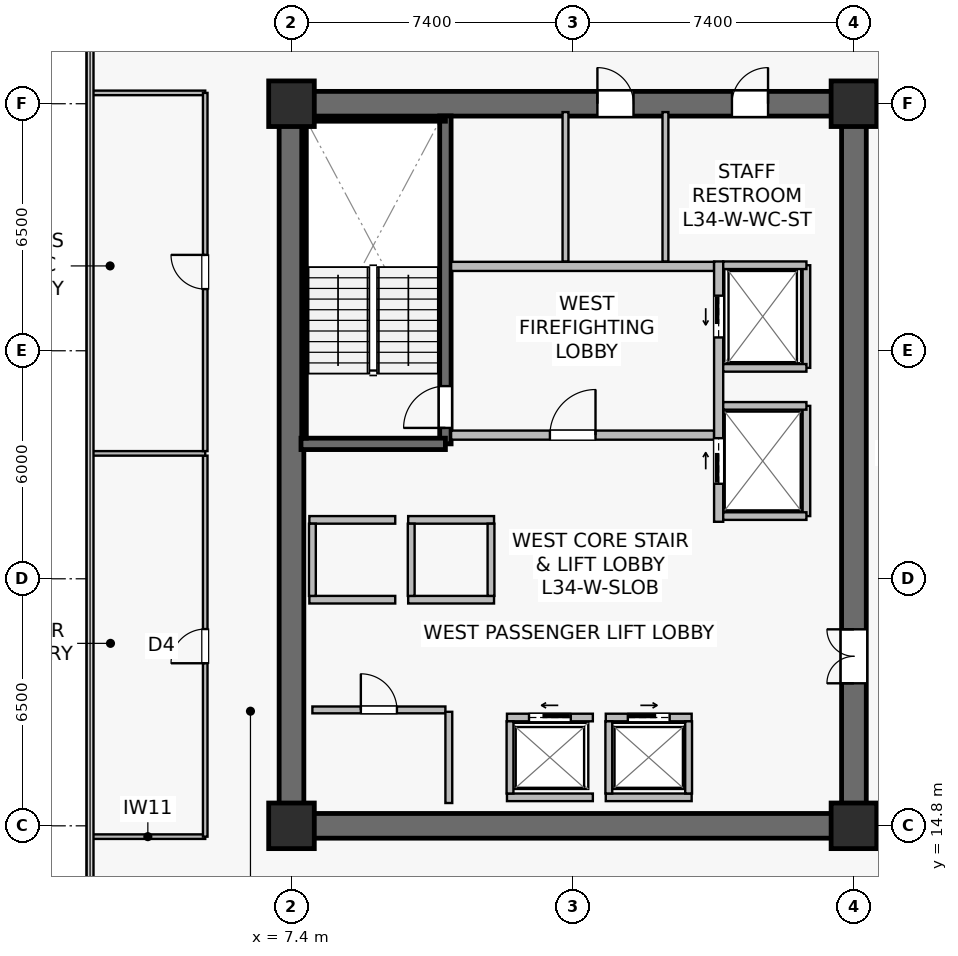
"""IFC4 building model, lengths in metres.
Left out: names, types, materials, properties, quantities, classifications, styles, units other than length and angle.
Written with IfcOpenShell. Run it as: python <this file> out.ifc"""

import sys

from ifc_helpers import new_model, si_unit, direction, frame, frame_2d, origin, origin_2d, place, context, subcontext, project, spatial, rectangle, extrude, source, transform, mapped, element, fill, save


model = new_model("IFC4")
c1 = context("Model", 3, precision=1e-05, world=origin(), true_north=direction((0.0, 1.0)))
c2 = subcontext(c1, "Body", "Model", "MODEL_VIEW")
j1 = project(units=[si_unit("LENGTHUNIT", "METRE"), si_unit("PLANEANGLEUNIT", "RADIAN")], contexts=[c1])
p1 = place(None, origin())
s1 = spatial("IfcSite", under=j1, at=p1, CompositionType="ELEMENT")
p2 = place(p1, origin())
s2 = spatial("IfcBuilding", under=s1, at=p2, CompositionType="ELEMENT")
p3 = place(p2, frame((0.0, 0.0, 142.0)))
s3 = spatial("IfcBuildingStorey", under=s2, at=p3, CompositionType="ELEMENT", Elevation=142.0)
p4 = place(p3, frame((7.075, 14.8, 0.0), z_axis=(0.0, 0.0, 1.0), x_axis=(1.0, 0.0, 0.0)))
e1 = element("IfcWall", 1, at=p4, inside=s3, PredefinedType="SHEAR", context=c2, shape_type="SweptSolid", body=[
    extrude(rectangle(XDim=15.45, YDim=0.65, at=frame_2d((7.725, 0.0))), origin(), (0.0, 0.0, 1.0), 3.79),
])
p5 = place(p3, frame((7.075, 33.8, 0.0), z_axis=(0.0, 0.0, 1.0), x_axis=(1.0, 0.0, 0.0)))
e2 = element("IfcWall", 2, at=p5, inside=s3, PredefinedType="SHEAR", context=c2, shape_type="SweptSolid", body=[
    extrude(rectangle(XDim=15.45, YDim=0.65, at=frame_2d((7.725, 0.0))), origin(), (0.0, 0.0, 1.0), 3.79),
])
p6 = place(p5, frame((8.375, 0.0, 0.0)))
e3 = element("IfcOpeningElement", 3, at=p6, cuts=e2, PredefinedType="OPENING", context=c2, shape_type="SweptSolid", body=[
    extrude(rectangle(XDim=0.95, YDim=2.15, at=frame_2d((0.475, 1.075))), frame((0.0, 0.335, 0.0), z_axis=(0.0, -1.0, 0.0), x_axis=(1.0, 0.0, 0.0)), (0.0, 0.0, 1.0), 0.67),
])
p7 = place(p5, frame((11.915, 0.0, 0.0)))
e4 = element("IfcOpeningElement", 4, at=p7, cuts=e2, PredefinedType="OPENING", context=c2, shape_type="SweptSolid", body=[
    extrude(rectangle(XDim=0.95, YDim=2.15, at=frame_2d((0.475, 1.075))), frame((0.0, 0.335, 0.0), z_axis=(0.0, -1.0, 0.0), x_axis=(1.0, 0.0, 0.0)), (0.0, 0.0, 1.0), 0.67),
])
p8 = place(p3, frame((7.4, 15.125, 0.0), z_axis=(0.0, 0.0, 1.0), x_axis=(0.0, 1.0, 0.0)))
e5 = element("IfcWall", 5, at=p8, inside=s3, PredefinedType="SHEAR", context=c2, shape_type="SweptSolid", body=[
    extrude(rectangle(XDim=18.35, YDim=0.65, at=frame_2d((9.175, 0.0))), origin(), (0.0, 0.0, 1.0), 3.79),
])
p9 = place(p3, frame((22.2, 15.125, 0.0), z_axis=(0.0, 0.0, 1.0), x_axis=(0.0, 1.0, 0.0)))
e6 = element("IfcWall", 6, at=p9, inside=s3, PredefinedType="SHEAR", context=c2, shape_type="SweptSolid", body=[
    extrude(rectangle(XDim=18.35, YDim=0.65, at=frame_2d((9.175, 0.0))), origin(), (0.0, 0.0, 1.0), 3.79),
])
p10 = place(p9, frame((3.425, 0.0, 0.0)))
e7 = element("IfcOpeningElement", 7, at=p10, cuts=e6, PredefinedType="OPENING", context=c2, shape_type="SweptSolid", body=[
    extrude(rectangle(XDim=1.42, YDim=2.2, at=frame_2d((0.71, 1.1))), frame((0.0, 0.335, 0.0), z_axis=(0.0, -1.0, 0.0), x_axis=(1.0, 0.0, 0.0)), (0.0, 0.0, 1.0), 0.67),
])
p11 = place(p3, frame((11.45, 24.85, 0.0), z_axis=(0.0, 0.0, 1.0), x_axis=(0.0, 1.0, 0.0)))
e8 = element("IfcWall", 8, at=p11, inside=s3, PredefinedType="SHEAR", context=c2, shape_type="SweptSolid", body=[
    extrude(rectangle(XDim=8.63, YDim=0.3, at=frame_2d((4.315, 0.0))), origin(), (0.0, 0.0, 1.0), 3.79),
])
p12 = place(p11, frame((0.42, 0.0, 0.0)))
e9 = element("IfcOpeningElement", 9, at=p12, cuts=e8, PredefinedType="OPENING", context=c2, shape_type="SweptSolid", body=[
    extrude(rectangle(XDim=1.1, YDim=2.15, at=frame_2d((0.55, 1.075))), frame((0.0, 0.16, 0.0), z_axis=(0.0, -1.0, 0.0), x_axis=(1.0, 0.0, 0.0)), (0.0, 0.0, 1.0), 0.32),
])
p13 = place(p3, frame((7.65, 24.85, 0.0), z_axis=(0.0, 0.0, 1.0), x_axis=(1.0, 0.0, 0.0)))
e10 = element("IfcWall", 10, at=p13, inside=s3, PredefinedType="SHEAR", context=c2, shape_type="SweptSolid", body=[
    extrude(rectangle(XDim=3.8, YDim=0.3, at=frame_2d((1.9, 0.0))), origin(), (0.0, 0.0, 1.0), 3.79),
])
p14 = place(p3, frame((7.73, 33.4, 0.0), z_axis=(0.0, 0.0, 1.0), x_axis=(1.0, 0.0, 0.0)))
e11 = element("IfcWall", 11, at=p14, inside=s3, PredefinedType="SOLIDWALL", context=c2, shape_type="SweptSolid", body=[
    extrude(rectangle(XDim=3.72, YDim=0.12, at=frame_2d((1.86, 0.0))), origin(), (0.0, 0.0, 1.0), 3.79),
])
p15 = place(p3, frame((7.73, 25.0, 0.0), z_axis=(0.0, 0.0, 1.0), x_axis=(0.0, 1.0, 0.0)))
e12 = element("IfcWall", 12, at=p15, inside=s3, PredefinedType="SOLIDWALL", context=c2, shape_type="SweptSolid", body=[
    extrude(rectangle(XDim=8.32, YDim=0.12, at=frame_2d((4.16, 0.0))), origin(), (0.0, 0.0, 1.0), 3.79),
])
m1 = source(origin(), c2, "Body", "SweptSolid", [
    extrude(rectangle(XDim=1.2, YDim=1.2, at=origin_2d()), origin(), (0.0, 0.0, 1.0), 4.1),
])
for number, where, z_axis, x_axis in (
    (13, (7.4, 14.8, 0.0), (0.0, 0.0, 1.0), (1.0, 0.0, 0.0)),
    (14, (22.2, 14.8, 0.0), (0.0, 0.0, 1.0), (1.0, 0.0, 0.0)),
    (15, (7.4, 33.8, 0.0), (0.0, 0.0, 1.0), (1.0, 0.0, 0.0)),
    (16, (22.2, 33.8, 0.0), (0.0, 0.0, 1.0), (1.0, 0.0, 0.0)),
):
    element("IfcColumn", number, at=place(p3, frame(where, z_axis=z_axis, x_axis=x_axis)), inside=s3, PredefinedType="COLUMN", context=c2, shape_type="MappedRepresentation", body=[
        mapped(m1, transform((0.0, 0.0, 0.0), scale=1.0)),
    ])
p16 = place(p3, frame((11.6, 25.08, 0.0), z_axis=(0.0, 0.0, 1.0), x_axis=(1.0, 0.0, 0.0)))
e17 = element("IfcWall", 17, at=p16, inside=s3, PredefinedType="SOLIDWALL", context=c2, shape_type="SweptSolid", body=[
    extrude(rectangle(XDim=6.92, YDim=0.24, at=frame_2d((3.46, 0.0))), origin(), (0.0, 0.0, 1.0), 3.125),
])
p17 = place(p16, frame((2.6, 0.0, 0.0)))
e18 = element("IfcOpeningElement", 18, at=p17, cuts=e17, PredefinedType="OPENING", context=c2, shape_type="SweptSolid", body=[
    extrude(rectangle(XDim=1.2, YDim=2.16, at=frame_2d((0.6, 1.08))), frame((0.0, 0.13, 0.0), z_axis=(0.0, -1.0, 0.0), x_axis=(1.0, 0.0, 0.0)), (0.0, 0.0, 1.0), 0.26),
])
p18 = place(p3, frame((11.6, 29.52, 0.0), z_axis=(0.0, 0.0, 1.0), x_axis=(1.0, 0.0, 0.0)))
e19 = element("IfcWall", 19, at=p18, inside=s3, PredefinedType="SOLIDWALL", context=c2, shape_type="SweptSolid", body=[
    extrude(rectangle(XDim=6.92, YDim=0.24, at=frame_2d((3.46, 0.0))), origin(), (0.0, 0.0, 1.0), 3.125),
])
p19 = place(p3, frame((18.64, 22.8, 0.0), z_axis=(0.0, 0.0, 1.0), x_axis=(0.0, 1.0, 0.0)))
e20 = element("IfcWall", 20, at=p19, inside=s3, PredefinedType="SOLIDWALL", context=c2, shape_type="SweptSolid", body=[
    extrude(rectangle(XDim=6.85, YDim=0.24, at=frame_2d((3.425, 0.0))), origin(), (0.0, 0.0, 1.0), 2.875),
])
p20 = place(p19, frame((4.85, 0.0, 0.0)))
e21 = element("IfcOpeningElement", 21, at=p20, cuts=e20, PredefinedType="OPENING", context=c2, shape_type="SweptSolid", body=[
    extrude(rectangle(XDim=1.1, YDim=2.22, at=frame_2d((0.55, 1.11))), frame((0.0, 0.13, 0.0), z_axis=(0.0, -1.0, 0.0), x_axis=(1.0, 0.0, 0.0)), (0.0, 0.0, 1.0), 0.26),
])
p21 = place(p19, frame((1.0, 0.0, 0.0)))
e22 = element("IfcOpeningElement", 22, at=p21, cuts=e20, PredefinedType="OPENING", context=c2, shape_type="SweptSolid", body=[
    extrude(rectangle(XDim=1.2, YDim=2.22, at=frame_2d((0.6, 1.11))), frame((0.0, 0.13, 0.0), z_axis=(0.0, -1.0, 0.0), x_axis=(1.0, 0.0, 0.0)), (0.0, 0.0, 1.0), 0.26),
])
p22 = place(p3, frame((13.07, 17.65, 0.0), z_axis=(0.0, 0.0, 1.0), x_axis=(1.0, 0.0, 0.0)))
e23 = element("IfcWall", 23, at=p22, inside=s3, PredefinedType="SOLIDWALL", context=c2, shape_type="SweptSolid", body=[
    extrude(rectangle(XDim=2.26, YDim=0.2, at=frame_2d((1.13, 0.0))), origin(), (0.0, 0.0, 1.0), 3.125),
])
p23 = place(p22, frame((0.58, 0.0, 0.0)))
e24 = element("IfcOpeningElement", 24, at=p23, cuts=e23, PredefinedType="OPENING", context=c2, shape_type="SweptSolid", body=[
    extrude(rectangle(XDim=1.1, YDim=2.22, at=frame_2d((0.55, 1.11))), frame((0.0, 0.11, 0.0), z_axis=(0.0, -1.0, 0.0), x_axis=(1.0, 0.0, 0.0)), (0.0, 0.0, 1.0), 0.22),
])
p24 = place(p3, frame((13.07, 15.55, 0.0), z_axis=(0.0, 0.0, 1.0), x_axis=(1.0, 0.0, 0.0)))
e25 = element("IfcWall", 25, at=p24, inside=s3, PredefinedType="SOLIDWALL", context=c2, shape_type="SweptSolid", body=[
    extrude(rectangle(XDim=2.26, YDim=0.2, at=frame_2d((1.13, 0.0))), origin(), (0.0, 0.0, 1.0), 3.125),
])
p25 = place(p3, frame((13.15, 15.65, 0.0), z_axis=(0.0, 0.0, 1.0), x_axis=(0.0, 1.0, 0.0)))
e26 = element("IfcWall", 26, at=p25, inside=s3, PredefinedType="SOLIDWALL", context=c2, shape_type="SweptSolid", body=[
    extrude(rectangle(XDim=1.9, YDim=0.18, at=frame_2d((0.95, 0.0))), origin(), (0.0, 0.0, 1.0), 3.79),
])
p26 = place(p3, frame((15.67, 17.65, 0.0), z_axis=(0.0, 0.0, 1.0), x_axis=(1.0, 0.0, 0.0)))
e27 = element("IfcWall", 27, at=p26, inside=s3, PredefinedType="SOLIDWALL", context=c2, shape_type="SweptSolid", body=[
    extrude(rectangle(XDim=2.26, YDim=0.2, at=frame_2d((1.13, 0.0))), origin(), (0.0, 0.0, 1.0), 3.79),
])
p27 = place(p26, frame((0.58, 0.0, 0.0)))
e28 = element("IfcOpeningElement", 28, at=p27, cuts=e27, PredefinedType="OPENING", context=c2, shape_type="SweptSolid", body=[
    extrude(rectangle(XDim=1.1, YDim=2.22, at=frame_2d((0.55, 1.11))), frame((0.0, 0.11, 0.0), z_axis=(0.0, -1.0, 0.0), x_axis=(1.0, 0.0, 0.0)), (0.0, 0.0, 1.0), 0.22),
])
p28 = place(p3, frame((15.67, 15.55, 0.0), z_axis=(0.0, 0.0, 1.0), x_axis=(1.0, 0.0, 0.0)))
e29 = element("IfcWall", 29, at=p28, inside=s3, PredefinedType="SOLIDWALL", context=c2, shape_type="SweptSolid", body=[
    extrude(rectangle(XDim=2.26, YDim=0.2, at=frame_2d((1.13, 0.0))), origin(), (0.0, 0.0, 1.0), 3.79),
])
for number, where, z_axis, x_axis in (
    (30, (15.75, 15.65, 0.0), (0.0, 0.0, 1.0), (0.0, 1.0, 0.0)),
    (31, (17.85, 15.65, 0.0), (0.0, 0.0, 1.0), (0.0, 1.0, 0.0)),
):
    element("IfcWall", number, at=place(p3, frame(where, z_axis=z_axis, x_axis=x_axis)), inside=s3, PredefinedType="SOLIDWALL", context=c2, shape_type="SweptSolid", body=[
        extrude(rectangle(XDim=1.9, YDim=0.18, at=frame_2d((0.95, 0.0))), origin(), (0.0, 0.0, 1.0), 3.79),
    ])
for number, where, z_axis, x_axis in (
    (32, (7.87, 20.75, 0.0), (0.0, 0.0, 1.0), (1.0, 0.0, 0.0)),
    (33, (7.87, 22.85, 0.0), (0.0, 0.0, 1.0), (1.0, 0.0, 0.0)),
):
    element("IfcWall", number, at=place(p3, frame(where, z_axis=z_axis, x_axis=x_axis)), inside=s3, PredefinedType="SOLIDWALL", context=c2, shape_type="SweptSolid", body=[
        extrude(rectangle(XDim=2.26, YDim=0.2, at=frame_2d((1.13, 0.0))), origin(), (0.0, 0.0, 1.0), 3.79),
    ])
p29 = place(p3, frame((7.95, 20.85, 0.0), z_axis=(0.0, 0.0, 1.0), x_axis=(0.0, 1.0, 0.0)))
e34 = element("IfcWall", 34, at=p29, inside=s3, PredefinedType="SOLIDWALL", context=c2, shape_type="SweptSolid", body=[
    extrude(rectangle(XDim=1.9, YDim=0.18, at=frame_2d((0.95, 0.0))), origin(), (0.0, 0.0, 1.0), 3.79),
])
for number, where, z_axis, x_axis in (
    (35, (10.47, 20.75, 0.0), (0.0, 0.0, 1.0), (1.0, 0.0, 0.0)),
    (36, (10.47, 22.85, 0.0), (0.0, 0.0, 1.0), (1.0, 0.0, 0.0)),
):
    element("IfcWall", number, at=place(p3, frame(where, z_axis=z_axis, x_axis=x_axis)), inside=s3, PredefinedType="SOLIDWALL", context=c2, shape_type="SweptSolid", body=[
        extrude(rectangle(XDim=2.26, YDim=0.2, at=frame_2d((1.13, 0.0))), origin(), (0.0, 0.0, 1.0), 3.79),
    ])
for number, where, z_axis, x_axis in (
    (37, (10.55, 20.85, 0.0), (0.0, 0.0, 1.0), (0.0, 1.0, 0.0)),
    (38, (12.65, 20.85, 0.0), (0.0, 0.0, 1.0), (0.0, 1.0, 0.0)),
):
    element("IfcWall", number, at=place(p3, frame(where, z_axis=z_axis, x_axis=x_axis)), inside=s3, PredefinedType="SOLIDWALL", context=c2, shape_type="SweptSolid", body=[
        extrude(rectangle(XDim=1.9, YDim=0.18, at=frame_2d((0.95, 0.0))), origin(), (0.0, 0.0, 1.0), 3.79),
    ])
p30 = place(p3, frame((20.95, 26.85, 0.0), z_axis=(0.0, 0.0, 1.0), x_axis=(0.0, 1.0, 0.0)))
e39 = element("IfcWall", 39, at=p30, inside=s3, PredefinedType="SOLIDWALL", context=c2, shape_type="SweptSolid", body=[
    extrude(rectangle(XDim=2.7, YDim=0.2, at=frame_2d((1.35, 0.0))), origin(), (0.0, 0.0, 1.0), 3.79),
])
p31 = place(p3, frame((18.76, 29.55, 0.0), z_axis=(0.0, 0.0, 1.0), x_axis=(1.0, 0.0, 0.0)))
e40 = element("IfcWall", 40, at=p31, inside=s3, PredefinedType="SOLIDWALL", context=c2, shape_type="SweptSolid", body=[
    extrude(rectangle(XDim=2.19, YDim=0.2, at=frame_2d((1.095, 0.0))), origin(), (0.0, 0.0, 1.0), 3.79),
])
p32 = place(p3, frame((18.76, 26.85, 0.0), z_axis=(0.0, 0.0, 1.0), x_axis=(1.0, 0.0, 0.0)))
e41 = element("IfcWall", 41, at=p32, inside=s3, PredefinedType="SOLIDWALL", context=c2, shape_type="SweptSolid", body=[
    extrude(rectangle(XDim=2.19, YDim=0.2, at=frame_2d((1.095, 0.0))), origin(), (0.0, 0.0, 1.0), 3.187),
])
p33 = place(p3, frame((20.95, 22.95, 0.0), z_axis=(0.0, 0.0, 1.0), x_axis=(0.0, 1.0, 0.0)))
e42 = element("IfcWall", 42, at=p33, inside=s3, PredefinedType="SOLIDWALL", context=c2, shape_type="SweptSolid", body=[
    extrude(rectangle(XDim=2.9, YDim=0.2, at=frame_2d((1.45, 0.0))), origin(), (0.0, 0.0, 1.0), 2.875),
])
for number, where, z_axis, x_axis in (
    (43, (18.76, 25.85, 0.0), (0.0, 0.0, 1.0), (1.0, 0.0, 0.0)),
    (44, (18.76, 22.95, 0.0), (0.0, 0.0, 1.0), (1.0, 0.0, 0.0)),
):
    element("IfcWall", number, at=place(p3, frame(where, z_axis=z_axis, x_axis=x_axis)), inside=s3, PredefinedType="SOLIDWALL", context=c2, shape_type="SweptSolid", body=[
        extrude(rectangle(XDim=2.19, YDim=0.2, at=frame_2d((1.095, 0.0))), origin(), (0.0, 0.0, 1.0), 3.79),
    ])
p34 = place(p3, frame((7.95, 17.85, 0.0), z_axis=(0.0, 0.0, 1.0), x_axis=(1.0, 0.0, 0.0)))
e45 = element("IfcWall", 45, at=p34, inside=s3, PredefinedType="SOLIDWALL", context=c2, shape_type="SweptSolid", body=[
    extrude(rectangle(XDim=3.5, YDim=0.18, at=frame_2d((1.75, 0.0))), origin(), (0.0, 0.0, 1.0), 3.79),
])
p35 = place(p34, frame((1.275, 0.0, 0.0)))
e46 = element("IfcOpeningElement", 46, at=p35, cuts=e45, PredefinedType="OPENING", context=c2, shape_type="SweptSolid", body=[
    extrude(rectangle(XDim=0.95, YDim=2.15, at=frame_2d((0.475, 1.075))), frame((0.0, 0.1, 0.0), z_axis=(0.0, -1.0, 0.0), x_axis=(1.0, 0.0, 0.0)), (0.0, 0.0, 1.0), 0.2),
])
p36 = place(p3, frame((11.54, 15.4, 0.0), z_axis=(0.0, 0.0, 1.0), x_axis=(0.0, 1.0, 0.0)))
e47 = element("IfcWall", 47, at=p36, inside=s3, PredefinedType="SOLIDWALL", context=c2, shape_type="SweptSolid", body=[
    extrude(rectangle(XDim=2.4, YDim=0.18, at=frame_2d((1.2, 0.0))), origin(), (0.0, 0.0, 1.0), 3.79),
])
p37 = place(p3, frame((14.61, 29.65, 0.0), z_axis=(0.0, 0.0, 1.0), x_axis=(0.0, 1.0, 0.0)))
e48 = element("IfcWall", 48, at=p37, inside=s3, PredefinedType="PLUMBINGWALL", context=c2, shape_type="SweptSolid", body=[
    extrude(rectangle(XDim=3.93, YDim=0.155, at=frame_2d((1.965, 0.0))), origin(), (0.0, 0.0, 1.0), 3.125),
])
p38 = place(p3, frame((17.24, 29.65, 0.0), z_axis=(0.0, 0.0, 1.0), x_axis=(0.0, 1.0, 0.0)))
e49 = element("IfcWall", 49, at=p38, inside=s3, PredefinedType="PLUMBINGWALL", context=c2, shape_type="SweptSolid", body=[
    extrude(rectangle(XDim=3.93, YDim=0.155, at=frame_2d((1.965, 0.0))), origin(), (0.0, 0.0, 1.0), 3.79),
])
for number, where, z_axis, x_axis in (
    (50, (2.11, 14.515, 0.0), (0.0, 0.0, 1.0), (1.0, 0.0, 0.0)),
    (51, (2.11, 34.085, 0.0), (0.0, 0.0, 1.0), (1.0, 0.0, 0.0)),
):
    element("IfcWall", number, at=place(p3, frame(where, z_axis=z_axis, x_axis=x_axis)), inside=s3, PredefinedType="PARTITIONING", context=c2, shape_type="SweptSolid", body=[
        extrude(rectangle(XDim=3.02, YDim=0.12, at=frame_2d((1.51, 0.0))), origin(), (0.0, 0.0, 1.0), 3.79),
    ])
p39 = place(p3, frame((5.13, 14.515, 0.0), z_axis=(0.0, 0.0, 1.0), x_axis=(0.0, 1.0, 0.0)))
e52 = element("IfcWall", 52, at=p39, inside=s3, PredefinedType="PARTITIONING", context=c2, shape_type="SweptSolid", body=[
    extrude(rectangle(XDim=10.025, YDim=0.12, at=frame_2d((5.013, 0.0))), origin(), (0.0, 0.0, 1.0), 3.79),
])
p40 = place(p39, frame((4.562, 0.0, 0.0)))
e53 = element("IfcOpeningElement", 53, at=p40, cuts=e52, PredefinedType="OPENING", context=c2, shape_type="SweptSolid", body=[
    extrude(rectangle(XDim=0.9, YDim=2.1, at=frame_2d((0.45, 1.05))), frame((0.0, 0.07, 0.0), z_axis=(0.0, -1.0, 0.0), x_axis=(1.0, 0.0, 0.0)), (0.0, 0.0, 1.0), 0.14),
])
p41 = place(p3, frame((2.11, 24.6, 0.0), z_axis=(0.0, 0.0, 1.0), x_axis=(1.0, 0.0, 0.0)))
e54 = element("IfcWall", 54, at=p41, inside=s3, PredefinedType="PARTITIONING", context=c2, shape_type="SweptSolid", body=[
    extrude(rectangle(XDim=3.02, YDim=0.12, at=frame_2d((1.51, 0.0))), origin(), (0.0, 0.0, 1.0), 3.79),
])
p42 = place(p3, frame((5.13, 24.66, 0.0), z_axis=(0.0, 0.0, 1.0), x_axis=(0.0, 1.0, 0.0)))
e55 = element("IfcWall", 55, at=p42, inside=s3, PredefinedType="PARTITIONING", context=c2, shape_type="SweptSolid", body=[
    extrude(rectangle(XDim=9.425, YDim=0.12, at=frame_2d((4.712, 0.0))), origin(), (0.0, 0.0, 1.0), 3.79),
])
p43 = place(p42, frame((4.262, 0.0, 0.0)))
e56 = element("IfcOpeningElement", 56, at=p43, cuts=e55, PredefinedType="OPENING", context=c2, shape_type="SweptSolid", body=[
    extrude(rectangle(XDim=0.9, YDim=2.1, at=frame_2d((0.45, 1.05))), frame((0.0, 0.07, 0.0), z_axis=(0.0, -1.0, 0.0), x_axis=(1.0, 0.0, 0.0)), (0.0, 0.0, 1.0), 0.14),
])
m2 = source(origin(), c2, "Body", "SweptSolid", [
    extrude(rectangle(XDim=1.1, YDim=2.15, at=frame_2d((0.55, 1.075))), frame((0.0, 0.025, 0.0), z_axis=(0.0, -1.0, 0.0), x_axis=(1.0, 0.0, 0.0)), (0.0, 0.0, 1.0), 0.05),
])
p44 = place(p12, origin())
e57 = element("IfcDoor", 57, at=p44, inside=s3, OperationType="SINGLE_SWING_LEFT", PredefinedType="DOOR", context=c2, shape_type="MappedRepresentation", body=[
    mapped(m2, transform((0.0, 0.0, 0.0), scale=1.0)),
])
fill(e9, e57)
m3 = source(origin(), c2, "Body", "SweptSolid", [
    extrude(rectangle(XDim=1.2, YDim=2.16, at=frame_2d((0.6, 1.08))), frame((0.0, 0.025, 0.0), z_axis=(0.0, -1.0, 0.0), x_axis=(1.0, 0.0, 0.0)), (0.0, 0.0, 1.0), 0.05),
])
p45 = place(p17, origin())
e58 = element("IfcDoor", 58, at=p45, inside=s3, OperationType="SINGLE_SWING_RIGHT", PredefinedType="DOOR", context=c2, shape_type="MappedRepresentation", body=[
    mapped(m3, transform((0.0, 0.0, 0.0), scale=1.0)),
])
fill(e18, e58)
m4 = source(origin(), c2, "Body", "SweptSolid", [
    extrude(rectangle(XDim=1.1, YDim=2.22, at=frame_2d((0.55, 1.11))), frame((0.0, 0.025, 0.0), z_axis=(0.0, -1.0, 0.0), x_axis=(1.0, 0.0, 0.0)), (0.0, 0.0, 1.0), 0.05),
])
p46 = place(p23, origin())
e59 = element("IfcDoor", 59, at=p46, inside=s3, OperationType="SLIDING_TO_LEFT", PredefinedType="USERDEFINED", context=c2, shape_type="MappedRepresentation", body=[
    mapped(m4, transform((0.0, 0.0, 0.0), scale=1.0)),
])
fill(e24, e59)
p47 = place(p27, origin())
e60 = element("IfcDoor", 60, at=p47, inside=s3, OperationType="SLIDING_TO_RIGHT", PredefinedType="USERDEFINED", context=c2, shape_type="MappedRepresentation", body=[
    mapped(m4, transform((0.0, 0.0, 0.0), scale=1.0)),
])
fill(e28, e60)
p48 = place(p20, origin())
e61 = element("IfcDoor", 61, at=p48, inside=s3, OperationType="SLIDING_TO_LEFT", PredefinedType="USERDEFINED", context=c2, shape_type="MappedRepresentation", body=[
    mapped(m4, transform((0.0, 0.0, 0.0), scale=1.0)),
])
fill(e21, e61)
m5 = source(origin(), c2, "Body", "SweptSolid", [
    extrude(rectangle(XDim=1.2, YDim=2.22, at=frame_2d((0.6, 1.11))), frame((0.0, 0.025, 0.0), z_axis=(0.0, -1.0, 0.0), x_axis=(1.0, 0.0, 0.0)), (0.0, 0.0, 1.0), 0.05),
])
p49 = place(p21, origin())
e62 = element("IfcDoor", 62, at=p49, inside=s3, OperationType="SLIDING_TO_RIGHT", PredefinedType="USERDEFINED", context=c2, shape_type="MappedRepresentation", body=[
    mapped(m5, transform((0.0, 0.0, 0.0), scale=1.0)),
])
fill(e22, e62)
m6 = source(origin(), c2, "Body", "SweptSolid", [
    extrude(rectangle(XDim=0.95, YDim=2.15, at=frame_2d((0.475, 1.075))), frame((0.0, 0.025, 0.0), z_axis=(0.0, -1.0, 0.0), x_axis=(1.0, 0.0, 0.0)), (0.0, 0.0, 1.0), 0.05),
])
p50 = place(p35, origin())
e63 = element("IfcDoor", 63, at=p50, inside=s3, OperationType="SINGLE_SWING_LEFT", PredefinedType="DOOR", context=c2, shape_type="MappedRepresentation", body=[
    mapped(m6, transform((0.0, 0.0, 0.0), scale=1.0)),
])
fill(e46, e63)
m7 = source(origin(), c2, "Body", "SweptSolid", [
    extrude(rectangle(XDim=1.42, YDim=2.2, at=frame_2d((0.71, 1.1))), frame((0.0, 0.025, 0.0), z_axis=(0.0, -1.0, 0.0), x_axis=(1.0, 0.0, 0.0)), (0.0, 0.0, 1.0), 0.05),
])
p51 = place(p10, origin())
e64 = element("IfcDoor", 64, at=p51, inside=s3, OperationType="DOUBLE_DOOR_SINGLE_SWING", PredefinedType="DOOR", context=c2, shape_type="MappedRepresentation", body=[
    mapped(m7, transform((0.0, 0.0, 0.0), scale=1.0)),
])
fill(e7, e64)
p52 = place(p6, origin())
e65 = element("IfcDoor", 65, at=p52, inside=s3, OperationType="SINGLE_SWING_LEFT", PredefinedType="DOOR", context=c2, shape_type="MappedRepresentation", body=[
    mapped(m6, transform((0.0, 0.0, 0.0), scale=1.0)),
])
fill(e3, e65)
p53 = place(p7, origin())
e66 = element("IfcDoor", 66, at=p53, inside=s3, OperationType="SINGLE_SWING_RIGHT", PredefinedType="DOOR", context=c2, shape_type="MappedRepresentation", body=[
    mapped(m6, transform((0.0, 0.0, 0.0), scale=1.0)),
])
fill(e4, e66)
m8 = source(origin(), c2, "Body", "SweptSolid", [
    extrude(rectangle(XDim=0.9, YDim=2.1, at=frame_2d((0.45, 1.05))), frame((0.0, 0.025, 0.0), z_axis=(0.0, -1.0, 0.0), x_axis=(1.0, 0.0, 0.0)), (0.0, 0.0, 1.0), 0.05),
])
p54 = place(p40, origin())
e67 = element("IfcDoor", 67, at=p54, inside=s3, OperationType="SINGLE_SWING_LEFT", PredefinedType="DOOR", context=c2, shape_type="MappedRepresentation", body=[
    mapped(m8, transform((0.0, 0.0, 0.0), scale=1.0)),
])
fill(e53, e67)
p55 = place(p43, origin())
e68 = element("IfcDoor", 68, at=p55, inside=s3, OperationType="SINGLE_SWING_RIGHT", PredefinedType="DOOR", context=c2, shape_type="MappedRepresentation", body=[
    mapped(m8, transform((0.0, 0.0, 0.0), scale=1.0)),
])
fill(e56, e68)
save(model, sys.argv[1])
